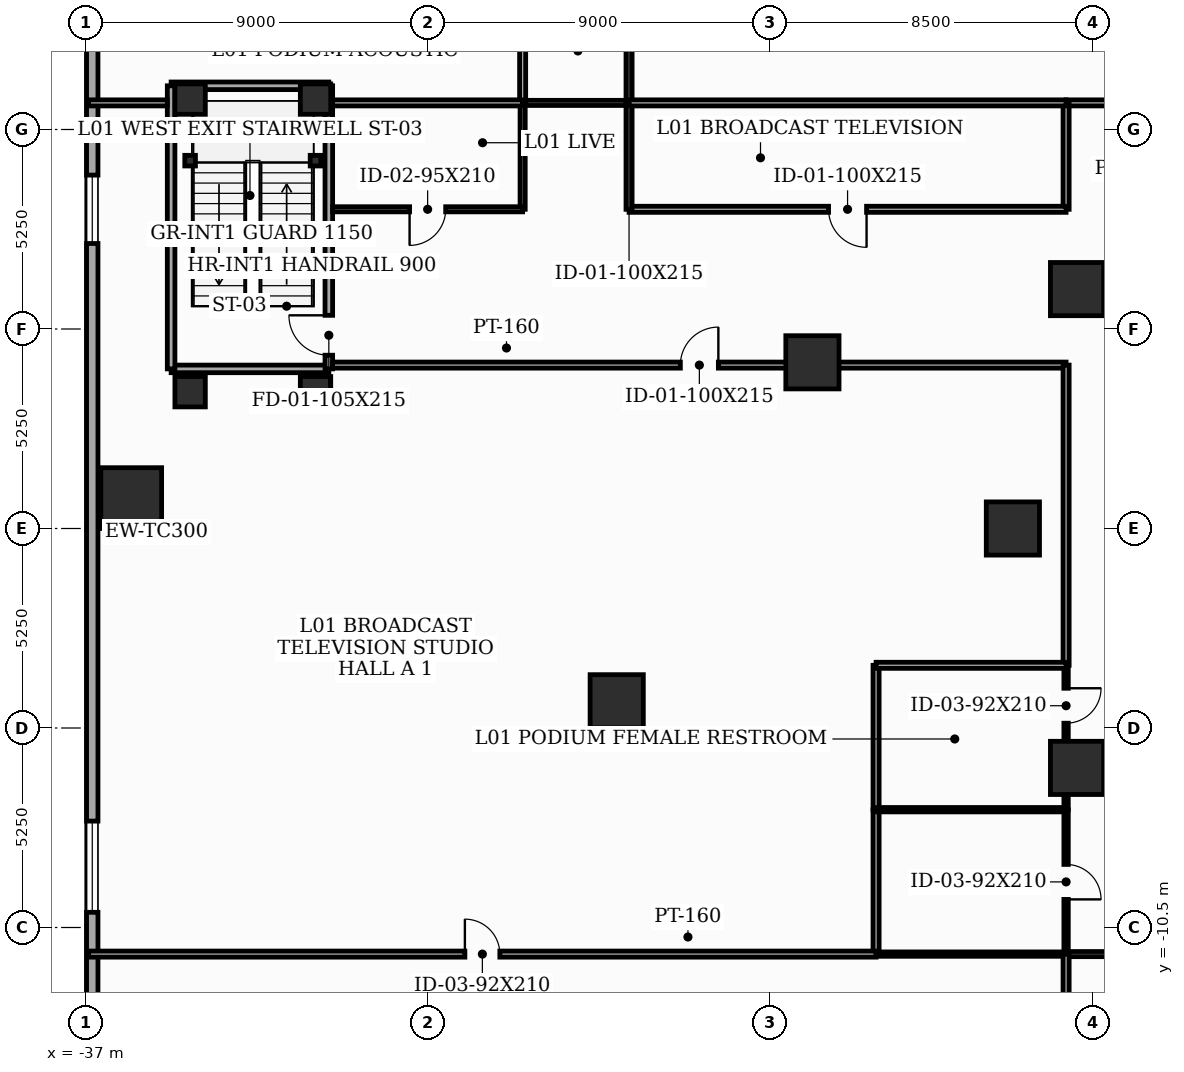
"""IFC4 building model, lengths in metres.
Left out: names, types, materials, properties, quantities, classifications, styles, units other than length and angle.
Written with IfcOpenShell. Run it as: python <this file> out.ifc"""

import sys

from ifc_helpers import new_model, si_unit, direction, frame, frame_2d, origin, origin_2d, place, context, subcontext, project, spatial, rectangle, i_section, extrude, element, fill, save


model = new_model("IFC4")
c1 = context("Model", 3, precision=1e-05, world=origin(), true_north=direction((0.0, 1.0)))
c2 = subcontext(c1, "Body", "Model", "MODEL_VIEW")
j1 = project(units=[si_unit("LENGTHUNIT", "METRE"), si_unit("PLANEANGLEUNIT", "RADIAN")], contexts=[c1])
p1 = place(None, origin())
s1 = spatial("IfcSite", under=j1, at=p1, CompositionType="ELEMENT")
p2 = place(p1, origin())
s2 = spatial("IfcBuilding", under=s1, at=p2, CompositionType="ELEMENT")
p3 = place(p2, frame((0.0, 0.0, 5.2)))
s3 = spatial("IfcBuildingStorey", under=s2, at=p3, CompositionType="ELEMENT", Elevation=5.2)
for number, where, z_axis, x_axis in (
    (1, (-10.912, 6.3, 0.0), (0.0, 0.0, 1.0), (1.0, 0.0, 0.0)),
    (2, (-12.6, 0.0, 0.0), (0.0, 0.0, 1.0), (1.0, 0.0, 0.0)),
    (3, (-10.912, -6.3, 0.0), (0.0, 0.0, 1.0), (1.0, 0.0, 0.0)),
):
    element("IfcColumn", number, at=place(p3, frame(where, z_axis=z_axis, x_axis=x_axis)), inside=s3, PredefinedType="COLUMN", context=c2, shape_type="SweptSolid", body=[
        extrude(rectangle(XDim=1.4, YDim=1.4, at=origin_2d()), origin(), (0.0, 0.0, 1.0), 5.2),
    ])
p4 = place(p3, frame((-35.8, 0.8, 0.0), z_axis=(0.0, 0.0, 1.0), x_axis=(1.0, 0.0, 0.0)))
e4 = element("IfcColumn", 4, at=p4, inside=s3, PredefinedType="COLUMN", context=c2, shape_type="SweptSolid", body=[
    extrude(rectangle(XDim=1.6, YDim=1.6, at=origin_2d()), origin(), (0.0, 0.0, 1.0), 5.2),
])
for number, where, z_axis, x_axis in (
    (5, (-17.875, 4.373, 0.0), (0.0, 0.0, 1.0), (1.0, 0.0, 0.0)),
    (6, (-23.025, -4.547, 0.0), (0.0, 0.0, 1.0), (1.0, 0.0, 0.0)),
):
    element("IfcColumn", number, at=place(p3, frame(where, z_axis=z_axis, x_axis=x_axis)), inside=s3, PredefinedType="COLUMN", context=c2, shape_type="SweptSolid", body=[
        extrude(rectangle(XDim=1.4, YDim=1.4, at=origin_2d()), origin(), (0.0, 0.0, 1.0), 5.2),
    ])
for number, where, z_axis, x_axis in (
    (7, (-34.25, 3.6, 0.0), (0.0, 0.0, 1.0), (1.0, 0.0, 0.0)),
    (8, (-30.95, 3.6, 0.0), (0.0, 0.0, 1.0), (1.0, 0.0, 0.0)),
    (9, (-30.95, 11.3, 0.0), (0.0, 0.0, 1.0), (1.0, 0.0, 0.0)),
    (10, (-34.25, 11.3, 0.0), (0.0, 0.0, 1.0), (1.0, 0.0, 0.0)),
):
    element("IfcColumn", number, at=place(p3, frame(where, z_axis=z_axis, x_axis=x_axis)), inside=s3, PredefinedType="COLUMN", context=c2, shape_type="SweptSolid", body=[
        extrude(rectangle(XDim=0.8, YDim=0.8, at=origin_2d()), origin(), (0.0, 0.0, 1.0), 5.2),
    ])
for number, where, z_axis, x_axis in (
    (11, (-34.25, 9.68, 0.0), (0.0, 0.0, 1.0), (1.0, 0.0, 0.0)),
    (12, (-30.95, 9.68, 0.0), (0.0, 0.0, 1.0), (1.0, 0.0, 0.0)),
):
    element("IfcColumn", number, at=place(p3, frame(where, z_axis=z_axis, x_axis=x_axis)), inside=s3, PredefinedType="PILASTER", context=c2, shape_type="SweptSolid", body=[
        extrude(i_section(OverallWidth=0.28, OverallDepth=0.28, WebThickness=0.01, FlangeThickness=0.018, at=origin_2d()), origin(), (0.0, 0.0, 1.0), 5.2),
    ])
p5 = place(p3, frame((-36.825, 28.5, 0.0), z_axis=(0.0, 0.0, 1.0), x_axis=(0.0, -1.0, 0.0)))
e13 = element("IfcWall", 13, at=p5, inside=s3, PredefinedType="SOLIDWALL", context=c2, shape_type="SweptSolid", body=[
    extrude(rectangle(XDim=48.0, YDim=0.3, at=frame_2d((24.0, 0.0))), origin(), (0.0, 0.0, 1.0), 4.95),
])
p6 = place(p5, frame((6.2, 0.0, 0.9)))
e14 = element("IfcOpeningElement", 14, at=p6, cuts=e13, PredefinedType="OPENING", context=c2, shape_type="SweptSolid", body=[
    extrude(rectangle(XDim=2.4, YDim=1.35, at=frame_2d((1.2, 0.675))), frame((0.0, 0.16, 0.0), z_axis=(0.0, -1.0, 0.0), x_axis=(1.0, 0.0, 0.0)), (0.0, 0.0, 1.0), 0.32),
])
p7 = place(p5, frame((19.2, 0.0, 0.9)))
e15 = element("IfcOpeningElement", 15, at=p7, cuts=e13, PredefinedType="OPENING", context=c2, shape_type="SweptSolid", body=[
    extrude(rectangle(XDim=1.8, YDim=1.35, at=frame_2d((0.9, 0.675))), frame((0.0, 0.16, 0.0), z_axis=(0.0, -1.0, 0.0), x_axis=(1.0, 0.0, 0.0)), (0.0, 0.0, 1.0), 0.32),
])
p8 = place(p5, frame((36.2, 0.0, 0.9)))
e16 = element("IfcOpeningElement", 16, at=p8, cuts=e13, PredefinedType="OPENING", context=c2, shape_type="SweptSolid", body=[
    extrude(rectangle(XDim=2.4, YDim=1.35, at=frame_2d((1.2, 0.675))), frame((0.0, 0.16, 0.0), z_axis=(0.0, -1.0, 0.0), x_axis=(1.0, 0.0, 0.0)), (0.0, 0.0, 1.0), 0.32),
])
p9 = place(p3, frame((-34.75, 4.2, 0.0), z_axis=(0.0, 0.0, 1.0), x_axis=(1.0, 0.0, 0.0)))
e17 = element("IfcWall", 17, at=p9, inside=s3, PredefinedType="SOLIDWALL", context=c2, shape_type="SweptSolid", body=[
    extrude(rectangle(XDim=4.15, YDim=0.2, at=frame_2d((2.075, 0.0))), origin(), (0.0, 0.0, 1.0), 4.95),
])
p10 = place(p3, frame((-30.6, 4.2, 0.0), z_axis=(0.0, 0.0, 1.0), x_axis=(0.0, 1.0, 0.0)))
e18 = element("IfcWall", 18, at=p10, inside=s3, PredefinedType="SOLIDWALL", context=c2, shape_type="SweptSolid", body=[
    extrude(rectangle(XDim=7.45, YDim=0.2, at=frame_2d((3.725, 0.0))), origin(), (0.0, 0.0, 1.0), 4.95),
])
p11 = place(p10, frame((0.36, 0.0, 0.0)))
e19 = element("IfcOpeningElement", 19, at=p11, cuts=e18, PredefinedType="OPENING", context=c2, shape_type="SweptSolid", body=[
    extrude(rectangle(XDim=1.05, YDim=2.15, at=frame_2d((0.525, 1.075))), frame((0.0, 0.11, 0.0), z_axis=(0.0, -1.0, 0.0), x_axis=(1.0, 0.0, 0.0)), (0.0, 0.0, 1.0), 0.22),
])
p12 = place(p3, frame((-30.6, 11.65, 0.0), z_axis=(0.0, 0.0, 1.0), x_axis=(-1.0, 0.0, 0.0)))
e20 = element("IfcWall", 20, at=p12, inside=s3, PredefinedType="SOLIDWALL", context=c2, shape_type="SweptSolid", body=[
    extrude(rectangle(XDim=4.15, YDim=0.2, at=frame_2d((2.075, 0.0))), origin(), (0.0, 0.0, 1.0), 4.95),
])
p13 = place(p3, frame((-34.75, 11.65, 0.0), z_axis=(0.0, 0.0, 1.0), x_axis=(0.0, -1.0, 0.0)))
e21 = element("IfcWall", 21, at=p13, inside=s3, PredefinedType="SOLIDWALL", context=c2, shape_type="SweptSolid", body=[
    extrude(rectangle(XDim=7.45, YDim=0.2, at=frame_2d((3.725, 0.0))), origin(), (0.0, 0.0, 1.0), 4.95),
])
p14 = place(p3, frame((-22.7, 11.2, 0.0), z_axis=(0.0, 0.0, 1.0), x_axis=(-1.0, 0.0, 0.0)))
e22 = element("IfcWall", 22, at=p14, inside=s3, PredefinedType="PARTITIONING", context=c2, shape_type="SweptSolid", body=[
    extrude(rectangle(XDim=2.8, YDim=0.135, at=frame_2d((1.4, 0.0))), origin(), (0.0, 0.0, 1.0), 4.95),
])
p15 = place(p3, frame((-30.5, 4.3, 0.0), z_axis=(0.0, 0.0, 1.0), x_axis=(1.0, 0.0, 0.0)))
e23 = element("IfcWall", 23, at=p15, inside=s3, PredefinedType="PARTITIONING", context=c2, shape_type="SweptSolid", body=[
    extrude(rectangle(XDim=19.3, YDim=0.16, at=frame_2d((9.65, 0.0))), origin(), (0.0, 0.0, 1.0), 3.435),
])
p16 = place(p15, frame((9.15, 0.0, 0.0)))
e24 = element("IfcOpeningElement", 24, at=p16, cuts=e23, PredefinedType="OPENING", context=c2, shape_type="SweptSolid", body=[
    extrude(rectangle(XDim=1.0, YDim=2.15, at=frame_2d((0.5, 1.075))), frame((0.0, 0.09, 0.0), z_axis=(0.0, -1.0, 0.0), x_axis=(1.0, 0.0, 0.0)), (0.0, 0.0, 1.0), 0.18),
])
p17 = place(p3, frame((-11.2, 4.3, 0.0), z_axis=(0.0, 0.0, 1.0), x_axis=(0.0, -1.0, 0.0)))
e25 = element("IfcWall", 25, at=p17, inside=s3, PredefinedType="PARTITIONING", context=c2, shape_type="SweptSolid", body=[
    extrude(rectangle(XDim=7.9, YDim=0.16, at=frame_2d((3.95, 0.0))), origin(), (0.0, 0.0, 1.0), 4.235),
])
p18 = place(p3, frame((-11.2, -3.6, 0.0), z_axis=(0.0, 0.0, 1.0), x_axis=(0.0, -1.0, 0.0)))
e26 = element("IfcWall", 26, at=p18, inside=s3, PredefinedType="PARTITIONING", context=c2, shape_type="SweptSolid", body=[
    extrude(rectangle(XDim=3.8, YDim=0.115, at=frame_2d((1.9, 0.0))), origin(), (0.0, 0.0, 1.0), 4.235),
])
p19 = place(p18, frame((0.604, 0.0, 0.0)))
e27 = element("IfcOpeningElement", 27, at=p19, cuts=e26, PredefinedType="OPENING", context=c2, shape_type="SweptSolid", body=[
    extrude(rectangle(XDim=0.92, YDim=2.1, at=frame_2d((0.46, 1.05))), frame((0.0, 0.067, 0.0), z_axis=(0.0, -1.0, 0.0), x_axis=(1.0, 0.0, 0.0)), (0.0, 0.0, 1.0), 0.135),
])
p20 = place(p3, frame((-11.2, -7.4, 0.0), z_axis=(0.0, 0.0, 1.0), x_axis=(0.0, -1.0, 0.0)))
e28 = element("IfcWall", 28, at=p20, inside=s3, PredefinedType="PARTITIONING", context=c2, shape_type="SweptSolid", body=[
    extrude(rectangle(XDim=3.8, YDim=0.115, at=frame_2d((1.9, 0.0))), origin(), (0.0, 0.0, 1.0), 4.95),
])
p21 = place(p20, frame((1.44, 0.0, 0.0)))
e29 = element("IfcOpeningElement", 29, at=p21, cuts=e28, PredefinedType="OPENING", context=c2, shape_type="SweptSolid", body=[
    extrude(rectangle(XDim=0.92, YDim=2.1, at=frame_2d((0.46, 1.05))), frame((0.0, 0.067, 0.0), z_axis=(0.0, -1.0, 0.0), x_axis=(1.0, 0.0, 0.0)), (0.0, 0.0, 1.0), 0.135),
])
p22 = place(p3, frame((-11.2, -11.2, 0.0), z_axis=(0.0, 0.0, 1.0), x_axis=(1.0, 0.0, 0.0)))
e30 = element("IfcWall", 30, at=p22, inside=s3, PredefinedType="PARTITIONING", context=c2, shape_type="SweptSolid", body=[
    extrude(rectangle(XDim=22.4, YDim=0.135, at=frame_2d((11.2, 0.0))), origin(), (0.0, 0.0, 1.0), 3.435),
])
p23 = place(p22, frame((8.037, 0.0, 0.0)))
e31 = element("IfcOpeningElement", 31, at=p23, cuts=e30, PredefinedType="OPENING", context=c2, shape_type="SweptSolid", body=[
    extrude(rectangle(XDim=0.95, YDim=2.1, at=frame_2d((0.475, 1.05))), frame((0.0, 0.077, 0.0), z_axis=(0.0, -1.0, 0.0), x_axis=(1.0, 0.0, 0.0)), (0.0, 0.0, 1.0), 0.155),
])
p24 = place(p3, frame((-5.0, 11.2, 0.0), z_axis=(0.0, 0.0, 1.0), x_axis=(-1.0, 0.0, 0.0)))
e32 = element("IfcWall", 32, at=p24, inside=s3, PredefinedType="PARTITIONING", context=c2, shape_type="SweptSolid", body=[
    extrude(rectangle(XDim=6.2, YDim=0.16, at=frame_2d((3.1, 0.0))), origin(), (0.0, 0.0, 1.0), 3.435),
])
p25 = place(p3, frame((-11.2, 11.2, 0.0), z_axis=(0.0, 0.0, 1.0), x_axis=(0.0, -1.0, 0.0)))
e33 = element("IfcWall", 33, at=p25, inside=s3, PredefinedType="PARTITIONING", context=c2, shape_type="SweptSolid", body=[
    extrude(rectangle(XDim=2.8, YDim=0.16, at=frame_2d((1.4, 0.0))), origin(), (0.0, 0.0, 1.0), 4.95),
])
p26 = place(p3, frame((-11.2, 8.4, 0.0), z_axis=(0.0, 0.0, 1.0), x_axis=(-1.0, 0.0, 0.0)))
e34 = element("IfcWall", 34, at=p26, inside=s3, PredefinedType="PARTITIONING", context=c2, shape_type="SweptSolid", body=[
    extrude(rectangle(XDim=11.5, YDim=0.16, at=frame_2d((5.75, 0.0))), origin(), (0.0, 0.0, 1.0), 4.235),
])
p27 = place(p26, frame((5.25, 0.0, 0.0)))
e35 = element("IfcOpeningElement", 35, at=p27, cuts=e34, PredefinedType="OPENING", context=c2, shape_type="SweptSolid", body=[
    extrude(rectangle(XDim=1.0, YDim=2.15, at=frame_2d((0.5, 1.075))), frame((0.0, 0.09, 0.0), z_axis=(0.0, -1.0, 0.0), x_axis=(1.0, 0.0, 0.0)), (0.0, 0.0, 1.0), 0.18),
])
p28 = place(p3, frame((-22.7, 8.4, 0.0), z_axis=(0.0, 0.0, 1.0), x_axis=(0.0, 1.0, 0.0)))
e36 = element("IfcWall", 36, at=p28, inside=s3, PredefinedType="PARTITIONING", context=c2, shape_type="SweptSolid", body=[
    extrude(rectangle(XDim=2.8, YDim=0.16, at=frame_2d((1.4, 0.0))), origin(), (0.0, 0.0, 1.0), 4.95),
])
p29 = place(p3, frame((-25.5, 11.2, 0.0), z_axis=(0.0, 0.0, 1.0), x_axis=(0.0, -1.0, 0.0)))
e37 = element("IfcWall", 37, at=p29, inside=s3, PredefinedType="PARTITIONING", context=c2, shape_type="SweptSolid", body=[
    extrude(rectangle(XDim=2.8, YDim=0.135, at=frame_2d((1.4, 0.0))), origin(), (0.0, 0.0, 1.0), 4.95),
])
p30 = place(p3, frame((-25.5, 8.4, 0.0), z_axis=(0.0, 0.0, 1.0), x_axis=(-1.0, 0.0, 0.0)))
e38 = element("IfcWall", 38, at=p30, inside=s3, PredefinedType="PARTITIONING", context=c2, shape_type="SweptSolid", body=[
    extrude(rectangle(XDim=5.0, YDim=0.135, at=frame_2d((2.5, 0.0))), origin(), (0.0, 0.0, 1.0), 4.95),
])
p31 = place(p30, frame((2.025, 0.0, 0.0)))
e39 = element("IfcOpeningElement", 39, at=p31, cuts=e38, PredefinedType="OPENING", context=c2, shape_type="SweptSolid", body=[
    extrude(rectangle(XDim=0.95, YDim=2.1, at=frame_2d((0.475, 1.05))), frame((0.0, 0.077, 0.0), z_axis=(0.0, -1.0, 0.0), x_axis=(1.0, 0.0, 0.0)), (0.0, 0.0, 1.0), 0.155),
])
p32 = place(p3, frame((-25.5, 13.8, 0.0), z_axis=(0.0, 0.0, 1.0), x_axis=(0.0, -1.0, 0.0)))
e40 = element("IfcWall", 40, at=p32, inside=s3, PredefinedType="PARTITIONING", context=c2, shape_type="SweptSolid", body=[
    extrude(rectangle(XDim=2.6, YDim=0.16, at=frame_2d((1.3, 0.0))), origin(), (0.0, 0.0, 1.0), 4.435),
])
p33 = place(p3, frame((-22.7, 11.2, 0.0), z_axis=(0.0, 0.0, 1.0), x_axis=(0.0, 1.0, 0.0)))
e41 = element("IfcWall", 41, at=p33, inside=s3, PredefinedType="PARTITIONING", context=c2, shape_type="SweptSolid", body=[
    extrude(rectangle(XDim=7.0, YDim=0.16, at=frame_2d((3.5, 0.0))), origin(), (0.0, 0.0, 1.0), 4.435),
])
p34 = place(p33, frame((3.0, 0.0, 0.0)))
e42 = element("IfcOpeningElement", 42, at=p34, cuts=e41, PredefinedType="OPENING", context=c2, shape_type="SweptSolid", body=[
    extrude(rectangle(XDim=1.0, YDim=2.15, at=frame_2d((0.5, 1.075))), frame((0.0, 0.09, 0.0), z_axis=(0.0, -1.0, 0.0), x_axis=(1.0, 0.0, 0.0)), (0.0, 0.0, 1.0), 0.18),
])
p35 = place(p3, frame((-16.2, -7.4, 0.0), z_axis=(0.0, 0.0, 1.0), x_axis=(0.0, 1.0, 0.0)))
e43 = element("IfcWall", 43, at=p35, inside=s3, PredefinedType="PARTITIONING", context=c2, shape_type="SweptSolid", body=[
    extrude(rectangle(XDim=3.8, YDim=0.16, at=frame_2d((1.9, 0.0))), origin(), (0.0, 0.0, 1.0), 4.235),
])
p36 = place(p3, frame((-16.2, -3.6, 0.0), z_axis=(0.0, 0.0, 1.0), x_axis=(1.0, 0.0, 0.0)))
e44 = element("IfcWall", 44, at=p36, inside=s3, PredefinedType="PARTITIONING", context=c2, shape_type="SweptSolid", body=[
    extrude(rectangle(XDim=5.0, YDim=0.16, at=frame_2d((2.5, 0.0))), origin(), (0.0, 0.0, 1.0), 4.235),
])
p37 = place(p3, frame((-16.2, -11.2, 0.0), z_axis=(0.0, 0.0, 1.0), x_axis=(0.0, 1.0, 0.0)))
e45 = element("IfcWall", 45, at=p37, inside=s3, PredefinedType="PARTITIONING", context=c2, shape_type="SweptSolid", body=[
    extrude(rectangle(XDim=3.8, YDim=0.16, at=frame_2d((1.9, 0.0))), origin(), (0.0, 0.0, 1.0), 4.95),
])
p38 = place(p3, frame((-36.92, -11.2, 0.0), z_axis=(0.0, 0.0, 1.0), x_axis=(1.0, 0.0, 0.0)))
e46 = element("IfcWall", 46, at=p38, inside=s3, PredefinedType="PARTITIONING", context=c2, shape_type="SweptSolid", body=[
    extrude(rectangle(XDim=20.72, YDim=0.16, at=frame_2d((10.36, 0.0))), origin(), (0.0, 0.0, 1.0), 3.435),
])
p39 = place(p38, frame((9.9, 0.0, 0.0)))
e47 = element("IfcOpeningElement", 47, at=p39, cuts=e46, PredefinedType="OPENING", context=c2, shape_type="SweptSolid", body=[
    extrude(rectangle(XDim=0.92, YDim=2.1, at=frame_2d((0.46, 1.05))), frame((0.0, 0.09, 0.0), z_axis=(0.0, -1.0, 0.0), x_axis=(1.0, 0.0, 0.0)), (0.0, 0.0, 1.0), 0.18),
])
p40 = place(p3, frame((-34.85, 11.2, 0.0), z_axis=(0.0, 0.0, 1.0), x_axis=(-1.0, 0.0, 0.0)))
e48 = element("IfcWall", 48, at=p40, inside=s3, PredefinedType="PARTITIONING", context=c2, shape_type="SweptSolid", body=[
    extrude(rectangle(XDim=2.07, YDim=0.16, at=frame_2d((1.035, 0.0))), origin(), (0.0, 0.0, 1.0), 4.235),
])
for number, where, z_axis, x_axis in (
    (49, (-16.2, -7.4, 0.0), (0.0, 0.0, 1.0), (1.0, 0.0, 0.0)),
    (50, (-16.2, -11.2, 0.0), (0.0, 0.0, 1.0), (1.0, 0.0, 0.0)),
):
    element("IfcWall", number, at=place(p3, frame(where, z_axis=z_axis, x_axis=x_axis)), inside=s3, PredefinedType="PARTITIONING", context=c2, shape_type="SweptSolid", body=[
        extrude(rectangle(XDim=5.0, YDim=0.115, at=frame_2d((2.5, 0.0))), origin(), (0.0, 0.0, 1.0), 4.95),
    ])
p41 = place(p3, frame((-11.2, -24.42, 0.0), z_axis=(0.0, 0.0, 1.0), x_axis=(0.0, 1.0, 0.0)))
e51 = element("IfcWall", 51, at=p41, inside=s3, PredefinedType="PARTITIONING", context=c2, shape_type="SweptSolid", body=[
    extrude(rectangle(XDim=13.22, YDim=0.16, at=frame_2d((6.61, 0.0))), origin(), (0.0, 0.0, 1.0), 3.435),
])
p42 = place(p3, frame((-22.7, 11.2, 0.0), z_axis=(0.0, 0.0, 1.0), x_axis=(1.0, 0.0, 0.0)))
e52 = element("IfcWall", 52, at=p42, inside=s3, PredefinedType="PARTITIONING", context=c2, shape_type="SweptSolid", body=[
    extrude(rectangle(XDim=11.5, YDim=0.16, at=frame_2d((5.75, 0.0))), origin(), (0.0, 0.0, 1.0), 4.235),
])
p43 = place(p3, frame((-30.5, 11.2, 0.0), z_axis=(0.0, 0.0, 1.0), x_axis=(1.0, 0.0, 0.0)))
e53 = element("IfcWall", 53, at=p43, inside=s3, PredefinedType="PARTITIONING", context=c2, shape_type="SweptSolid", body=[
    extrude(rectangle(XDim=5.0, YDim=0.16, at=frame_2d((2.5, 0.0))), origin(), (0.0, 0.0, 1.0), 4.95),
])
p44 = place(p7, origin())
e54 = element("IfcWindow", 54, at=p44, inside=s3, PartitioningType="SINGLE_PANEL", PredefinedType="WINDOW", context=c2, shape_type="SweptSolid", body=[
    extrude(rectangle(XDim=1.8, YDim=1.35, at=frame_2d((0.9, 0.675))), frame((0.0, 0.03, 0.0), z_axis=(0.0, -1.0, 0.0), x_axis=(1.0, 0.0, 0.0)), (0.0, 0.0, 1.0), 0.06),
])
fill(e15, e54)
p45 = place(p8, origin())
e55 = element("IfcWindow", 55, at=p45, inside=s3, PartitioningType="SINGLE_PANEL", PredefinedType="WINDOW", context=c2, shape_type="SweptSolid", body=[
    extrude(rectangle(XDim=2.4, YDim=1.35, at=frame_2d((1.2, 0.675))), frame((0.0, 0.03, 0.0), z_axis=(0.0, -1.0, 0.0), x_axis=(1.0, 0.0, 0.0)), (0.0, 0.0, 1.0), 0.06),
])
fill(e16, e55)
p46 = place(p11, origin())
e56 = element("IfcDoor", 56, at=p46, inside=s3, OperationType="SINGLE_SWING_RIGHT", PredefinedType="DOOR", context=c2, shape_type="SweptSolid", body=[
    extrude(rectangle(XDim=1.05, YDim=2.15, at=frame_2d((0.525, 1.075))), frame((0.0, 0.025, 0.0), z_axis=(0.0, -1.0, 0.0), x_axis=(1.0, 0.0, 0.0)), (0.0, 0.0, 1.0), 0.05),
])
fill(e19, e56)
p47 = place(p16, origin())
e57 = element("IfcDoor", 57, at=p47, inside=s3, OperationType="SINGLE_SWING_RIGHT", PredefinedType="DOOR", context=c2, shape_type="SweptSolid", body=[
    extrude(rectangle(XDim=1.0, YDim=2.15, at=frame_2d((0.5, 1.075))), frame((0.0, 0.025, 0.0), z_axis=(0.0, -1.0, 0.0), x_axis=(1.0, 0.0, 0.0)), (0.0, 0.0, 1.0), 0.05),
])
fill(e24, e57)
p48 = place(p19, origin())
e58 = element("IfcDoor", 58, at=p48, inside=s3, OperationType="SINGLE_SWING_LEFT", PredefinedType="DOOR", context=c2, shape_type="SweptSolid", body=[
    extrude(rectangle(XDim=0.92, YDim=2.1, at=frame_2d((0.46, 1.05))), frame((0.0, 0.025, 0.0), z_axis=(0.0, -1.0, 0.0), x_axis=(1.0, 0.0, 0.0)), (0.0, 0.0, 1.0), 0.05),
])
fill(e27, e58)
p49 = place(p21, origin())
e59 = element("IfcDoor", 59, at=p49, inside=s3, OperationType="SINGLE_SWING_RIGHT", PredefinedType="DOOR", context=c2, shape_type="SweptSolid", body=[
    extrude(rectangle(XDim=0.92, YDim=2.1, at=frame_2d((0.46, 1.05))), frame((0.0, 0.025, 0.0), z_axis=(0.0, -1.0, 0.0), x_axis=(1.0, 0.0, 0.0)), (0.0, 0.0, 1.0), 0.05),
])
fill(e29, e59)
p50 = place(p27, origin())
e60 = element("IfcDoor", 60, at=p50, inside=s3, OperationType="SINGLE_SWING_LEFT", PredefinedType="DOOR", context=c2, shape_type="SweptSolid", body=[
    extrude(rectangle(XDim=1.0, YDim=2.15, at=frame_2d((0.5, 1.075))), frame((0.0, 0.025, 0.0), z_axis=(0.0, -1.0, 0.0), x_axis=(1.0, 0.0, 0.0)), (0.0, 0.0, 1.0), 0.05),
])
fill(e35, e60)
p51 = place(p31, origin())
e61 = element("IfcDoor", 61, at=p51, inside=s3, OperationType="SINGLE_SWING_RIGHT", PredefinedType="DOOR", context=c2, shape_type="SweptSolid", body=[
    extrude(rectangle(XDim=0.95, YDim=2.1, at=frame_2d((0.475, 1.05))), frame((0.0, 0.025, 0.0), z_axis=(0.0, -1.0, 0.0), x_axis=(1.0, 0.0, 0.0)), (0.0, 0.0, 1.0), 0.05),
])
fill(e39, e61)
p52 = place(p39, origin())
e62 = element("IfcDoor", 62, at=p52, inside=s3, OperationType="SINGLE_SWING_LEFT", PredefinedType="DOOR", context=c2, shape_type="SweptSolid", body=[
    extrude(rectangle(XDim=0.92, YDim=2.1, at=frame_2d((0.46, 1.05))), frame((0.0, 0.025, 0.0), z_axis=(0.0, -1.0, 0.0), x_axis=(1.0, 0.0, 0.0)), (0.0, 0.0, 1.0), 0.05),
])
fill(e47, e62)
save(model, sys.argv[1])
